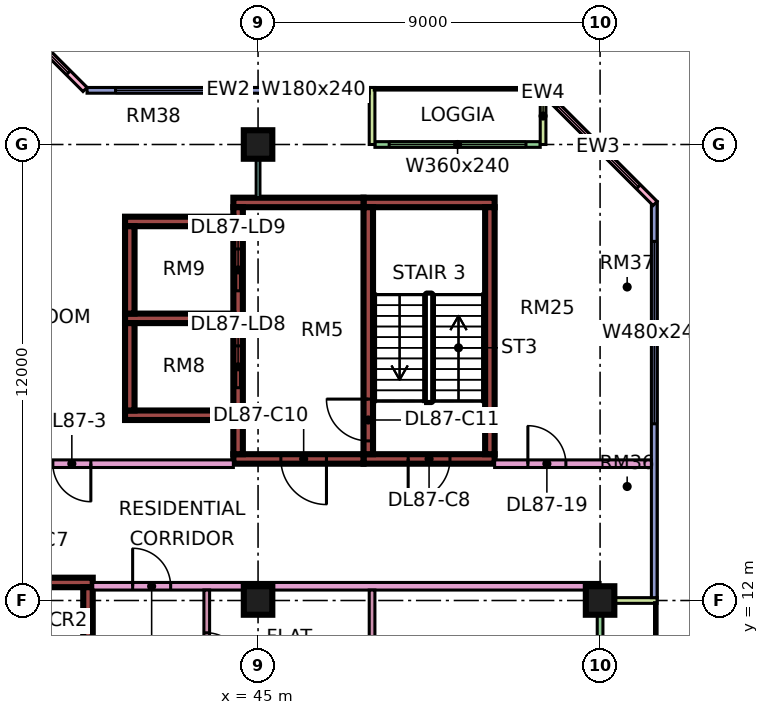
"""IFC4 building model, lengths in metres.
Left out: names, types, materials, properties, quantities, classifications, styles, units other than length and angle.
Written with IfcOpenShell. Run it as: python <this file> out.ifc"""

import sys

from ifc_helpers import new_model, si_unit, direction, frame, frame_2d, origin, origin_2d, place, context, subcontext, project, spatial, rectangle, extrude, element, fill, save


model = new_model("IFC4")
c1 = context("Model", 3, precision=1e-05, world=origin(), true_north=direction((0.0, 1.0)))
c2 = subcontext(c1, "Body", "Model", "MODEL_VIEW")
j1 = project(units=[si_unit("LENGTHUNIT", "METRE"), si_unit("PLANEANGLEUNIT", "RADIAN")], contexts=[c1])
p1 = place(None, origin())
s1 = spatial("IfcSite", under=j1, at=p1, CompositionType="ELEMENT")
p2 = place(p1, origin())
s2 = spatial("IfcBuilding", under=s1, at=p2, CompositionType="ELEMENT")
p3 = place(p2, frame((0.0, 0.0, 372.65)))
s3 = spatial("IfcBuildingStorey", under=s2, at=p3, CompositionType="ELEMENT", Elevation=372.65)
for number, where, z_axis, x_axis in (
    (1, (45.0, 12.0, 0.0), (0.0, 0.0, 1.0), (1.0, 0.0, 0.0)),
    (2, (45.0, 24.0, 0.0), (0.0, 0.0, 1.0), (1.0, 0.0, 0.0)),
    (3, (54.0, 12.0, 0.0), (0.0, 0.0, 1.0), (1.0, 0.0, 0.0)),
):
    element("IfcColumn", number, at=place(p3, frame(where, z_axis=z_axis, x_axis=x_axis)), inside=s3, PredefinedType="COLUMN", context=c2, shape_type="SweptSolid", body=[
        extrude(rectangle(XDim=0.75, YDim=0.75, at=origin_2d()), origin(), (0.0, 0.0, 1.0), 3.75),
    ])
p4 = place(p3, frame((36.375, 12.475, 0.0), z_axis=(0.0, 0.0, 1.0), x_axis=(1.0, 0.0, 0.0)))
e4 = element("IfcWall", 4, at=p4, inside=s3, PredefinedType="SHEAR", context=c2, shape_type="SweptSolid", body=[
    extrude(rectangle(XDim=4.275, YDim=0.25, at=frame_2d((2.137, 0.0))), origin(), (0.0, 0.0, 1.0), 3.75),
])
p5 = place(p4, frame((2.0, 0.0, 0.0)))
e5 = element("IfcOpeningElement", 5, at=p5, cuts=e4, PredefinedType="OPENING", context=c2, shape_type="SweptSolid", body=[
    extrude(rectangle(XDim=1.1, YDim=2.2, at=frame_2d((0.55, 1.1))), frame((0.0, 0.135, 0.0), z_axis=(0.0, -1.0, 0.0), x_axis=(1.0, 0.0, 0.0)), (0.0, 0.0, 1.0), 0.27),
])
p6 = place(p3, frame((40.525, 5.85, 0.0), z_axis=(0.0, 0.0, 1.0), x_axis=(0.0, 1.0, 0.0)))
e6 = element("IfcWall", 6, at=p6, inside=s3, PredefinedType="SHEAR", context=c2, shape_type="SweptSolid", body=[
    extrude(rectangle(XDim=6.5, YDim=0.25, at=frame_2d((3.25, 0.0))), origin(), (0.0, 0.0, 1.0), 3.75),
])
p7 = place(p3, frame((47.775, 15.725, 0.0), z_axis=(0.0, 0.0, 1.0), x_axis=(1.0, 0.0, 0.0)))
e7 = element("IfcWall", 7, at=p7, inside=s3, PredefinedType="SHEAR", context=c2, shape_type="SweptSolid", body=[
    extrude(rectangle(XDim=3.45, YDim=0.25, at=frame_2d((1.725, 0.0))), origin(), (0.0, 0.0, 1.0), 3.75),
])
p8 = place(p7, frame((1.175, 0.0, 0.0)))
e8 = element("IfcOpeningElement", 8, at=p8, cuts=e7, PredefinedType="OPENING", context=c2, shape_type="SweptSolid", body=[
    extrude(rectangle(XDim=1.1, YDim=2.2, at=frame_2d((0.55, 1.1))), frame((0.0, 0.135, 0.0), z_axis=(0.0, -1.0, 0.0), x_axis=(1.0, 0.0, 0.0)), (0.0, 0.0, 1.0), 0.27),
])
p9 = place(p3, frame((47.775, 22.475, 0.0), z_axis=(0.0, 0.0, 1.0), x_axis=(1.0, 0.0, 0.0)))
e9 = element("IfcWall", 9, at=p9, inside=s3, PredefinedType="SHEAR", context=c2, shape_type="SweptSolid", body=[
    extrude(rectangle(XDim=3.45, YDim=0.25, at=frame_2d((1.725, 0.0))), origin(), (0.0, 0.0, 1.0), 3.75),
])
p10 = place(p3, frame((47.9, 15.85, 0.0), z_axis=(0.0, 0.0, 1.0), x_axis=(0.0, 1.0, 0.0)))
e10 = element("IfcWall", 10, at=p10, inside=s3, PredefinedType="SHEAR", context=c2, shape_type="SweptSolid", body=[
    extrude(rectangle(XDim=6.5, YDim=0.25, at=frame_2d((3.25, 0.0))), origin(), (0.0, 0.0, 1.0), 3.75),
])
p11 = place(p10, frame((0.35, 0.0, 0.0)))
e11 = element("IfcOpeningElement", 11, at=p11, cuts=e10, PredefinedType="OPENING", context=c2, shape_type="SweptSolid", body=[
    extrude(rectangle(XDim=1.1, YDim=2.2, at=frame_2d((0.55, 1.1))), frame((0.0, 0.135, 0.0), z_axis=(0.0, -1.0, 0.0), x_axis=(1.0, 0.0, 0.0)), (0.0, 0.0, 1.0), 0.27),
])
p12 = place(p3, frame((51.1, 15.85, 0.0), z_axis=(0.0, 0.0, 1.0), x_axis=(0.0, 1.0, 0.0)))
e12 = element("IfcWall", 12, at=p12, inside=s3, PredefinedType="SHEAR", context=c2, shape_type="SweptSolid", body=[
    extrude(rectangle(XDim=6.5, YDim=0.25, at=frame_2d((3.25, 0.0))), origin(), (0.0, 0.0, 1.0), 3.75),
])
p13 = place(p3, frame((44.35, 15.725, 0.0), z_axis=(0.0, 0.0, 1.0), x_axis=(1.0, 0.0, 0.0)))
e13 = element("IfcWall", 13, at=p13, inside=s3, PredefinedType="SHEAR", context=c2, shape_type="SweptSolid", body=[
    extrude(rectangle(XDim=3.425, YDim=0.25, at=frame_2d((1.712, 0.0))), origin(), (0.0, 0.0, 1.0), 3.75),
])
p14 = place(p13, frame((1.25, 0.0, 0.0)))
e14 = element("IfcOpeningElement", 14, at=p14, cuts=e13, PredefinedType="OPENING", context=c2, shape_type="SweptSolid", body=[
    extrude(rectangle(XDim=1.2, YDim=2.2, at=frame_2d((0.6, 1.1))), frame((0.0, 0.135, 0.0), z_axis=(0.0, -1.0, 0.0), x_axis=(1.0, 0.0, 0.0)), (0.0, 0.0, 1.0), 0.27),
])
p15 = place(p3, frame((44.35, 22.475, 0.0), z_axis=(0.0, 0.0, 1.0), x_axis=(1.0, 0.0, 0.0)))
e15 = element("IfcWall", 15, at=p15, inside=s3, PredefinedType="SHEAR", context=c2, shape_type="SweptSolid", body=[
    extrude(rectangle(XDim=3.425, YDim=0.25, at=frame_2d((1.712, 0.0))), origin(), (0.0, 0.0, 1.0), 3.75),
])
p16 = place(p3, frame((44.475, 15.85, 0.0), z_axis=(0.0, 0.0, 1.0), x_axis=(0.0, 1.0, 0.0)))
e16 = element("IfcWall", 16, at=p16, inside=s3, PredefinedType="SHEAR", context=c2, shape_type="SweptSolid", body=[
    extrude(rectangle(XDim=6.5, YDim=0.25, at=frame_2d((3.25, 0.0))), origin(), (0.0, 0.0, 1.0), 3.75),
])
p17 = place(p16, frame((1.75, 0.0, 0.0)))
e17 = element("IfcOpeningElement", 17, at=p17, cuts=e16, PredefinedType="OPENING", context=c2, shape_type="SweptSolid", body=[
    extrude(rectangle(XDim=1.1, YDim=2.2, at=frame_2d((0.55, 1.1))), frame((0.0, 0.135, 0.0), z_axis=(0.0, -1.0, 0.0), x_axis=(1.0, 0.0, 0.0)), (0.0, 0.0, 1.0), 0.27),
])
p18 = place(p16, frame((4.3, 0.0, 0.0)))
e18 = element("IfcOpeningElement", 18, at=p18, cuts=e16, PredefinedType="OPENING", context=c2, shape_type="SweptSolid", body=[
    extrude(rectangle(XDim=1.1, YDim=2.2, at=frame_2d((0.55, 1.1))), frame((0.0, 0.135, 0.0), z_axis=(0.0, -1.0, 0.0), x_axis=(1.0, 0.0, 0.0)), (0.0, 0.0, 1.0), 0.27),
])
for number, where, z_axis, x_axis in (
    (19, (41.5, 16.875, 0.0), (0.0, 0.0, 1.0), (1.0, 0.0, 0.0)),
    (20, (41.5, 19.425, 0.0), (0.0, 0.0, 1.0), (1.0, 0.0, 0.0)),
    (21, (41.5, 21.975, 0.0), (0.0, 0.0, 1.0), (1.0, 0.0, 0.0)),
):
    element("IfcWall", number, at=place(p3, frame(where, z_axis=z_axis, x_axis=x_axis)), inside=s3, PredefinedType="SHEAR", context=c2, shape_type="SweptSolid", body=[
        extrude(rectangle(XDim=2.85, YDim=0.25, at=frame_2d((1.425, 0.0))), origin(), (0.0, 0.0, 1.0), 3.75),
    ])
for number, where, z_axis, x_axis in (
    (22, (41.625, 17.0, 0.0), (0.0, 0.0, 1.0), (0.0, 1.0, 0.0)),
    (23, (41.625, 19.55, 0.0), (0.0, 0.0, 1.0), (0.0, 1.0, 0.0)),
):
    element("IfcWall", number, at=place(p3, frame(where, z_axis=z_axis, x_axis=x_axis)), inside=s3, PredefinedType="SHEAR", context=c2, shape_type="SweptSolid", body=[
        extrude(rectangle(XDim=2.3, YDim=0.25, at=frame_2d((1.15, 0.0))), origin(), (0.0, 0.0, 1.0), 3.75),
    ])
p19 = place(p3, frame((52.425, 24.0, 0.0), z_axis=(0.0, 0.0, 1.0), x_axis=(-1.0, 0.0, 0.0)))
e24 = element("IfcWall", 24, at=p19, inside=s3, PredefinedType="SOLIDWALL", context=c2, shape_type="SweptSolid", body=[
    extrude(rectangle(XDim=4.35, YDim=0.15, at=frame_2d((2.175, 0.0))), origin(), (0.0, 0.0, 1.0), 3.35),
])
p20 = place(p19, frame((0.375, 0.0, 0.45)))
e25 = element("IfcOpeningElement", 25, at=p20, cuts=e24, PredefinedType="OPENING", context=c2, shape_type="SweptSolid", body=[
    extrude(rectangle(XDim=3.6, YDim=2.4, at=frame_2d((1.8, 1.2))), frame((0.0, 0.085, 0.0), z_axis=(0.0, -1.0, 0.0), x_axis=(1.0, 0.0, 0.0)), (0.0, 0.0, 1.0), 0.17),
])
for number, where, z_axis, x_axis in (
    (26, (52.5, 25.5, 0.0), (0.0, 0.0, 1.0), (0.0, -1.0, 0.0)),
    (27, (48.0, 25.5, 0.0), (0.0, 0.0, 1.0), (0.0, -1.0, 0.0)),
):
    element("IfcWall", number, at=place(p3, frame(where, z_axis=z_axis, x_axis=x_axis)), inside=s3, PredefinedType="SOLIDWALL", context=c2, shape_type="SweptSolid", body=[
        extrude(rectangle(XDim=1.5, YDim=0.15, at=frame_2d((0.75, 0.0))), origin(), (0.0, 0.0, 1.0), 3.35),
    ])
p21 = place(p3, frame((47.925, 25.425, 0.0), z_axis=(0.0, 0.0, 1.0), x_axis=(-1.0, 0.0, 0.0)))
e28 = element("IfcWall", 28, at=p21, inside=s3, PredefinedType="SOLIDWALL", context=c2, shape_type="SweptSolid", body=[
    extrude(rectangle(XDim=7.425, YDim=0.15, at=frame_2d((3.712, 0.0))), origin(), (0.0, 0.0, 1.0), 3.35),
])
p22 = place(p21, frame((0.562, 0.0, 0.45)))
e29 = element("IfcOpeningElement", 29, at=p22, cuts=e28, PredefinedType="OPENING", context=c2, shape_type="SweptSolid", body=[
    extrude(rectangle(XDim=1.8, YDim=2.4, at=frame_2d((0.9, 1.2))), frame((0.0, 0.085, 0.0), z_axis=(0.0, -1.0, 0.0), x_axis=(1.0, 0.0, 0.0)), (0.0, 0.0, 1.0), 0.17),
])
p23 = place(p21, frame((3.675, 0.0, 0.45)))
e30 = element("IfcOpeningElement", 30, at=p23, cuts=e28, PredefinedType="OPENING", context=c2, shape_type="SweptSolid", body=[
    extrude(rectangle(XDim=3.0, YDim=2.4, at=frame_2d((1.5, 1.2))), frame((0.0, 0.085, 0.0), z_axis=(0.0, -1.0, 0.0), x_axis=(1.0, 0.0, 0.0)), (0.0, 0.0, 1.0), 0.17),
])
p24 = place(p3, frame((40.447, 25.447, 0.0), z_axis=(0.0, 0.0, 1.0), x_axis=(-0.707106781187, 0.707106781187, 0.0)))
e31 = element("IfcWall", 31, at=p24, inside=s3, PredefinedType="SOLIDWALL", context=c2, shape_type="SweptSolid", body=[
    extrude(rectangle(XDim=4.243, YDim=0.15, at=frame_2d((2.121, 0.0))), origin(), (0.0, 0.0, 1.0), 3.35),
])
p25 = place(p24, frame((0.621, 0.0, 0.45)))
e32 = element("IfcOpeningElement", 32, at=p25, cuts=e31, PredefinedType="OPENING", context=c2, shape_type="SweptSolid", body=[
    extrude(rectangle(XDim=3.0, YDim=2.4, at=frame_2d((1.5, 1.2))), frame((0.0, 0.085, 0.0), z_axis=(0.0, -1.0, 0.0), x_axis=(1.0, 0.0, 0.0)), (0.0, 0.0, 1.0), 0.17),
])
p26 = place(p3, frame((54.0, 1.575, 0.0), z_axis=(0.0, 0.0, 1.0), x_axis=(0.0, 1.0, 0.0)))
e33 = element("IfcWall", 33, at=p26, inside=s3, PredefinedType="SOLIDWALL", context=c2, shape_type="SweptSolid", body=[
    extrude(rectangle(XDim=10.35, YDim=0.15, at=frame_2d((5.175, 0.0))), origin(), (0.0, 0.0, 1.0), 3.35),
])
p27 = place(p26, frame((0.663, 0.0, 0.0)))
e34 = element("IfcOpeningElement", 34, at=p27, cuts=e33, PredefinedType="OPENING", context=c2, shape_type="SweptSolid", body=[
    extrude(rectangle(XDim=1.8, YDim=2.4, at=frame_2d((0.9, 1.2))), frame((0.0, 0.085, 0.0), z_axis=(0.0, -1.0, 0.0), x_axis=(1.0, 0.0, 0.0)), (0.0, 0.0, 1.0), 0.17),
])
p28 = place(p26, frame((5.637, 0.0, 0.45)))
e35 = element("IfcOpeningElement", 35, at=p28, cuts=e33, PredefinedType="OPENING", context=c2, shape_type="SweptSolid", body=[
    extrude(rectangle(XDim=3.0, YDim=2.4, at=frame_2d((1.5, 1.2))), frame((0.0, 0.085, 0.0), z_axis=(0.0, -1.0, 0.0), x_axis=(1.0, 0.0, 0.0)), (0.0, 0.0, 1.0), 0.17),
])
p29 = place(p3, frame((55.5, 12.0, 0.0), z_axis=(0.0, 0.0, 1.0), x_axis=(-1.0, 0.0, 0.0)))
e36 = element("IfcWall", 36, at=p29, inside=s3, PredefinedType="SOLIDWALL", context=c2, shape_type="SweptSolid", body=[
    extrude(rectangle(XDim=1.5, YDim=0.15, at=frame_2d((0.75, 0.0))), origin(), (0.0, 0.0, 1.0), 3.35),
])
p30 = place(p3, frame((55.425, 12.075, 0.0), z_axis=(0.0, 0.0, 1.0), x_axis=(0.0, 1.0, 0.0)))
e37 = element("IfcWall", 37, at=p30, inside=s3, PredefinedType="SOLIDWALL", context=c2, shape_type="SweptSolid", body=[
    extrude(rectangle(XDim=10.425, YDim=0.15, at=frame_2d((5.212, 0.0))), origin(), (0.0, 0.0, 1.0), 3.35),
])
p31 = place(p30, frame((4.575, 0.0, 0.45)))
e38 = element("IfcOpeningElement", 38, at=p31, cuts=e37, PredefinedType="OPENING", context=c2, shape_type="SweptSolid", body=[
    extrude(rectangle(XDim=4.8, YDim=2.4, at=frame_2d((2.4, 1.2))), frame((0.0, 0.085, 0.0), z_axis=(0.0, -1.0, 0.0), x_axis=(1.0, 0.0, 0.0)), (0.0, 0.0, 1.0), 0.17),
])
p32 = place(p3, frame((55.447, 22.447, 0.0), z_axis=(0.0, 0.0, 1.0), x_axis=(-0.707106781187, 0.707106781187, 0.0)))
e39 = element("IfcWall", 39, at=p32, inside=s3, PredefinedType="SOLIDWALL", context=c2, shape_type="SweptSolid", body=[
    extrude(rectangle(XDim=4.243, YDim=0.15, at=frame_2d((2.121, 0.0))), origin(), (0.0, 0.0, 1.0), 3.35),
])
p33 = place(p32, frame((0.621, 0.0, 0.45)))
e40 = element("IfcOpeningElement", 40, at=p33, cuts=e39, PredefinedType="OPENING", context=c2, shape_type="SweptSolid", body=[
    extrude(rectangle(XDim=3.0, YDim=2.4, at=frame_2d((1.5, 1.2))), frame((0.0, 0.085, 0.0), z_axis=(0.0, -1.0, 0.0), x_axis=(1.0, 0.0, 0.0)), (0.0, 0.0, 1.0), 0.17),
])
p34 = place(p3, frame((34.0, 15.6, 0.0), z_axis=(0.0, 0.0, 1.0), x_axis=(1.0, 0.0, 0.0)))
e41 = element("IfcWall", 41, at=p34, inside=s3, PredefinedType="PARTITIONING", context=c2, shape_type="SweptSolid", body=[
    extrude(rectangle(XDim=10.35, YDim=0.2, at=frame_2d((5.175, 0.0))), origin(), (0.0, 0.0, 1.0), 3.35),
])
p35 = place(p34, frame((5.6, 0.0, 0.0)))
e42 = element("IfcOpeningElement", 42, at=p35, cuts=e41, PredefinedType="OPENING", context=c2, shape_type="SweptSolid", body=[
    extrude(rectangle(XDim=1.0, YDim=2.1, at=frame_2d((0.5, 1.05))), frame((0.0, 0.11, 0.0), z_axis=(0.0, -1.0, 0.0), x_axis=(1.0, 0.0, 0.0)), (0.0, 0.0, 1.0), 0.22),
])
p36 = place(p34, frame((0.45, 0.0, 0.0)))
e43 = element("IfcOpeningElement", 43, at=p36, cuts=e41, PredefinedType="OPENING", context=c2, shape_type="SweptSolid", body=[
    extrude(rectangle(XDim=1.2, YDim=2.1, at=frame_2d((0.6, 1.05))), frame((0.0, 0.11, 0.0), z_axis=(0.0, -1.0, 0.0), x_axis=(1.0, 0.0, 0.0)), (0.0, 0.0, 1.0), 0.22),
])
p37 = place(p3, frame((40.65, 12.375, 0.0), z_axis=(0.0, 0.0, 1.0), x_axis=(1.0, 0.0, 0.0)))
e44 = element("IfcWall", 44, at=p37, inside=s3, PredefinedType="PARTITIONING", context=c2, shape_type="SweptSolid", body=[
    extrude(rectangle(XDim=13.35, YDim=0.2, at=frame_2d((6.675, 0.0))), origin(), (0.0, 0.0, 1.0), 3.35),
])
p38 = place(p37, frame((1.05, 0.0, 0.0)))
e45 = element("IfcOpeningElement", 45, at=p38, cuts=e44, PredefinedType="OPENING", context=c2, shape_type="SweptSolid", body=[
    extrude(rectangle(XDim=1.0, YDim=2.1, at=frame_2d((0.5, 1.05))), frame((0.0, 0.11, 0.0), z_axis=(0.0, -1.0, 0.0), x_axis=(1.0, 0.0, 0.0)), (0.0, 0.0, 1.0), 0.22),
])
p39 = place(p3, frame((43.65, 5.975, 0.0), z_axis=(0.0, 0.0, 1.0), x_axis=(0.0, 1.0, 0.0)))
e46 = element("IfcWall", 46, at=p39, inside=s3, PredefinedType="PARTITIONING", context=c2, shape_type="SweptSolid", body=[
    extrude(rectangle(XDim=6.3, YDim=0.15, at=frame_2d((3.15, 0.0))), origin(), (0.0, 0.0, 1.0), 3.35),
])
p40 = place(p39, frame((4.275, 0.0, 0.0)))
e47 = element("IfcOpeningElement", 47, at=p40, cuts=e46, PredefinedType="OPENING", context=c2, shape_type="SweptSolid", body=[
    extrude(rectangle(XDim=0.9, YDim=2.1, at=frame_2d((0.45, 1.05))), frame((0.0, 0.085, 0.0), z_axis=(0.0, -1.0, 0.0), x_axis=(1.0, 0.0, 0.0)), (0.0, 0.0, 1.0), 0.17),
])
p41 = place(p3, frame((45.0, 22.6, 0.0), z_axis=(0.0, 0.0, 1.0), x_axis=(0.0, 1.0, 0.0)))
e48 = element("IfcWall", 48, at=p41, inside=s3, PredefinedType="PARTITIONING", context=c2, shape_type="SweptSolid", body=[
    extrude(rectangle(XDim=1.4, YDim=0.1, at=frame_2d((0.7, 0.0))), origin(), (0.0, 0.0, 1.0), 3.35),
])
p42 = place(p3, frame((48.0, 5.975, 0.0), z_axis=(0.0, 0.0, 1.0), x_axis=(0.0, 1.0, 0.0)))
e49 = element("IfcWall", 49, at=p42, inside=s3, PredefinedType="PARTITIONING", context=c2, shape_type="SweptSolid", body=[
    extrude(rectangle(XDim=6.3, YDim=0.15, at=frame_2d((3.15, 0.0))), origin(), (0.0, 0.0, 1.0), 3.35),
])
p43 = place(p3, frame((51.225, 15.6, 0.0), z_axis=(0.0, 0.0, 1.0), x_axis=(1.0, 0.0, 0.0)))
e50 = element("IfcWall", 50, at=p43, inside=s3, PredefinedType="PARTITIONING", context=c2, shape_type="SweptSolid", body=[
    extrude(rectangle(XDim=4.125, YDim=0.2, at=frame_2d((2.062, 0.0))), origin(), (0.0, 0.0, 1.0), 3.35),
])
p44 = place(p43, frame((0.875, 0.0, 0.0)))
e51 = element("IfcOpeningElement", 51, at=p44, cuts=e50, PredefinedType="OPENING", context=c2, shape_type="SweptSolid", body=[
    extrude(rectangle(XDim=1.0, YDim=2.1, at=frame_2d((0.5, 1.05))), frame((0.0, 0.11, 0.0), z_axis=(0.0, -1.0, 0.0), x_axis=(1.0, 0.0, 0.0)), (0.0, 0.0, 1.0), 0.22),
])
p45 = place(p20, origin())
e52 = element("IfcWindow", 52, at=p45, inside=s3, PartitioningType="SINGLE_PANEL", PredefinedType="WINDOW", context=c2, shape_type="SweptSolid", body=[
    extrude(rectangle(XDim=3.6, YDim=2.4, at=frame_2d((1.8, 1.2))), frame((0.0, 0.03, 0.0), z_axis=(0.0, -1.0, 0.0), x_axis=(1.0, 0.0, 0.0)), (0.0, 0.0, 1.0), 0.06),
])
fill(e25, e52)
p46 = place(p22, origin())
e53 = element("IfcWindow", 53, at=p46, inside=s3, PartitioningType="SINGLE_PANEL", PredefinedType="WINDOW", context=c2, shape_type="SweptSolid", body=[
    extrude(rectangle(XDim=1.8, YDim=2.4, at=frame_2d((0.9, 1.2))), frame((0.0, 0.03, 0.0), z_axis=(0.0, -1.0, 0.0), x_axis=(1.0, 0.0, 0.0)), (0.0, 0.0, 1.0), 0.06),
])
fill(e29, e53)
p47 = place(p23, origin())
e54 = element("IfcWindow", 54, at=p47, inside=s3, PartitioningType="SINGLE_PANEL", PredefinedType="WINDOW", context=c2, shape_type="SweptSolid", body=[
    extrude(rectangle(XDim=3.0, YDim=2.4, at=frame_2d((1.5, 1.2))), frame((0.0, 0.03, 0.0), z_axis=(0.0, -1.0, 0.0), x_axis=(1.0, 0.0, 0.0)), (0.0, 0.0, 1.0), 0.06),
])
fill(e30, e54)
p48 = place(p25, origin())
e55 = element("IfcWindow", 55, at=p48, inside=s3, PartitioningType="SINGLE_PANEL", PredefinedType="WINDOW", context=c2, shape_type="SweptSolid", body=[
    extrude(rectangle(XDim=3.0, YDim=2.4, at=frame_2d((1.5, 1.2))), frame((0.0, 0.03, 0.0), z_axis=(0.0, -1.0, 0.0), x_axis=(1.0, 0.0, 0.0)), (0.0, 0.0, 1.0), 0.06),
])
fill(e32, e55)
p49 = place(p31, origin())
e56 = element("IfcWindow", 56, at=p49, inside=s3, PartitioningType="SINGLE_PANEL", PredefinedType="WINDOW", context=c2, shape_type="SweptSolid", body=[
    extrude(rectangle(XDim=4.8, YDim=2.4, at=frame_2d((2.4, 1.2))), frame((0.0, 0.03, 0.0), z_axis=(0.0, -1.0, 0.0), x_axis=(1.0, 0.0, 0.0)), (0.0, 0.0, 1.0), 0.06),
])
fill(e38, e56)
p50 = place(p33, origin())
e57 = element("IfcWindow", 57, at=p50, inside=s3, PartitioningType="SINGLE_PANEL", PredefinedType="WINDOW", context=c2, shape_type="SweptSolid", body=[
    extrude(rectangle(XDim=3.0, YDim=2.4, at=frame_2d((1.5, 1.2))), frame((0.0, 0.03, 0.0), z_axis=(0.0, -1.0, 0.0), x_axis=(1.0, 0.0, 0.0)), (0.0, 0.0, 1.0), 0.06),
])
fill(e40, e57)
p51 = place(p8, frame((1.1, 0.0, 0.0), z_axis=(0.0, 0.0, 1.0), x_axis=(-1.0, 0.0, 0.0)))
e58 = element("IfcDoor", 58, at=p51, inside=s3, OperationType="SINGLE_SWING_LEFT", PredefinedType="DOOR", context=c2, shape_type="SweptSolid", body=[
    extrude(rectangle(XDim=1.1, YDim=2.2, at=frame_2d((0.55, 1.1))), frame((0.0, 0.025, 0.0), z_axis=(0.0, -1.0, 0.0), x_axis=(1.0, 0.0, 0.0)), (0.0, 0.0, 1.0), 0.05),
])
fill(e8, e58)
p52 = place(p14, origin())
e59 = element("IfcDoor", 59, at=p52, inside=s3, OperationType="SINGLE_SWING_RIGHT", PredefinedType="DOOR", context=c2, shape_type="SweptSolid", body=[
    extrude(rectangle(XDim=1.2, YDim=2.2, at=frame_2d((0.6, 1.1))), frame((0.0, 0.025, 0.0), z_axis=(0.0, -1.0, 0.0), x_axis=(1.0, 0.0, 0.0)), (0.0, 0.0, 1.0), 0.05),
])
fill(e14, e59)
p53 = place(p11, frame((1.1, 0.0, 0.0), z_axis=(0.0, 0.0, 1.0), x_axis=(-1.0, 0.0, 0.0)))
e60 = element("IfcDoor", 60, at=p53, inside=s3, OperationType="SINGLE_SWING_RIGHT", PredefinedType="DOOR", context=c2, shape_type="SweptSolid", body=[
    extrude(rectangle(XDim=1.1, YDim=2.2, at=frame_2d((0.55, 1.1))), frame((0.0, 0.025, 0.0), z_axis=(0.0, -1.0, 0.0), x_axis=(1.0, 0.0, 0.0)), (0.0, 0.0, 1.0), 0.05),
])
fill(e11, e60)
p54 = place(p17, origin())
e61 = element("IfcDoor", 61, at=p54, inside=s3, OperationType="DOUBLE_DOOR_SLIDING", PredefinedType="DOOR", context=c2, shape_type="SweptSolid", body=[
    extrude(rectangle(XDim=1.1, YDim=2.2, at=frame_2d((0.55, 1.1))), frame((0.0, 0.025, 0.0), z_axis=(0.0, -1.0, 0.0), x_axis=(1.0, 0.0, 0.0)), (0.0, 0.0, 1.0), 0.05),
])
fill(e17, e61)
p55 = place(p18, origin())
e62 = element("IfcDoor", 62, at=p55, inside=s3, OperationType="DOUBLE_DOOR_SLIDING", PredefinedType="DOOR", context=c2, shape_type="SweptSolid", body=[
    extrude(rectangle(XDim=1.1, YDim=2.2, at=frame_2d((0.55, 1.1))), frame((0.0, 0.025, 0.0), z_axis=(0.0, -1.0, 0.0), x_axis=(1.0, 0.0, 0.0)), (0.0, 0.0, 1.0), 0.05),
])
fill(e18, e62)
p56 = place(p35, origin())
e63 = element("IfcDoor", 63, at=p56, inside=s3, OperationType="SINGLE_SWING_RIGHT", PredefinedType="DOOR", context=c2, shape_type="SweptSolid", body=[
    extrude(rectangle(XDim=1.0, YDim=2.1, at=frame_2d((0.5, 1.05))), frame((0.0, 0.025, 0.0), z_axis=(0.0, -1.0, 0.0), x_axis=(1.0, 0.0, 0.0)), (0.0, 0.0, 1.0), 0.05),
])
fill(e42, e63)
p57 = place(p44, origin())
e64 = element("IfcDoor", 64, at=p57, inside=s3, OperationType="SINGLE_SWING_LEFT", PredefinedType="DOOR", context=c2, shape_type="SweptSolid", body=[
    extrude(rectangle(XDim=1.0, YDim=2.1, at=frame_2d((0.5, 1.05))), frame((0.0, 0.025, 0.0), z_axis=(0.0, -1.0, 0.0), x_axis=(1.0, 0.0, 0.0)), (0.0, 0.0, 1.0), 0.05),
])
fill(e51, e64)
p58 = place(p38, origin())
e65 = element("IfcDoor", 65, at=p58, inside=s3, OperationType="SINGLE_SWING_LEFT", PredefinedType="DOOR", context=c2, shape_type="SweptSolid", body=[
    extrude(rectangle(XDim=1.0, YDim=2.1, at=frame_2d((0.5, 1.05))), frame((0.0, 0.025, 0.0), z_axis=(0.0, -1.0, 0.0), x_axis=(1.0, 0.0, 0.0)), (0.0, 0.0, 1.0), 0.05),
])
fill(e45, e65)
p59 = place(p40, frame((0.9, 0.0, 0.0), z_axis=(0.0, 0.0, 1.0), x_axis=(-1.0, 0.0, 0.0)))
e66 = element("IfcDoor", 66, at=p59, inside=s3, OperationType="SINGLE_SWING_LEFT", PredefinedType="DOOR", context=c2, shape_type="SweptSolid", body=[
    extrude(rectangle(XDim=0.9, YDim=2.1, at=frame_2d((0.45, 1.05))), frame((0.0, 0.025, 0.0), z_axis=(0.0, -1.0, 0.0), x_axis=(1.0, 0.0, 0.0)), (0.0, 0.0, 1.0), 0.05),
])
fill(e47, e66)
save(model, sys.argv[1])
